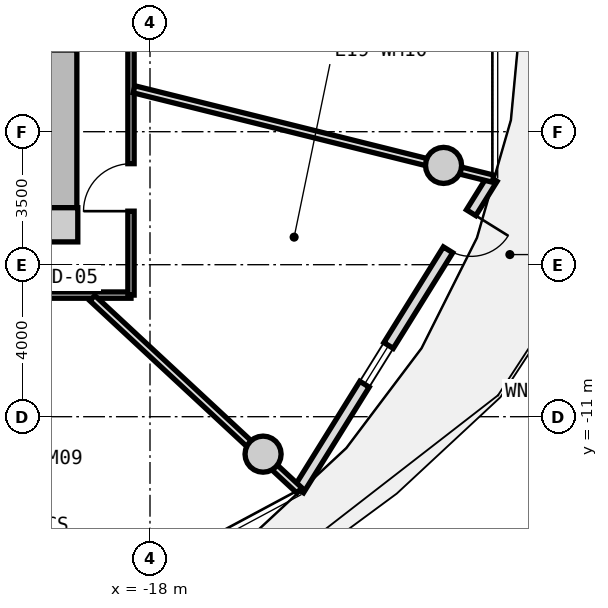
"""IFC4 building model, lengths in metres.
Left out: names, types, materials, properties, quantities, classifications, styles, units other than length and angle.
Written with IfcOpenShell. Run it as: python <this file> out.ifc"""

import sys

from ifc_helpers import new_model, si_unit, direction, frame, frame_2d, origin, origin_2d, place, context, subcontext, project, spatial, rectangle, circle, extrude, source, transform, mapped, element, fill, save


model = new_model("IFC4")
c1 = context("Model", 3, precision=1e-05, world=origin(), true_north=direction((0.0, 1.0)))
c2 = subcontext(c1, "Body", "Model", "MODEL_VIEW")
j1 = project(units=[si_unit("LENGTHUNIT", "METRE"), si_unit("PLANEANGLEUNIT", "RADIAN")], contexts=[c1])
p1 = place(None, origin())
s1 = spatial("IfcSite", under=j1, at=p1, CompositionType="ELEMENT")
p2 = place(p1, origin())
s2 = spatial("IfcBuilding", under=s1, at=p2, CompositionType="ELEMENT")
p3 = place(p2, frame((0.0, 0.0, 64.3)))
s3 = spatial("IfcBuildingStorey", under=s2, at=p3, CompositionType="ELEMENT", Elevation=64.3)
m1 = source(origin(), c2, "Body", "SweptSolid", [
    extrude(rectangle(XDim=0.9, YDim=0.9, at=origin_2d()), origin(), (0.0, 0.0, 1.0), 3.05),
])
p4 = place(p3, frame((-20.35, -5.95, 0.0), z_axis=(0.0, 0.0, 1.0), x_axis=(1.0, 0.0, 0.0)))
e1 = element("IfcColumn", 1, at=p4, inside=s3, PredefinedType="COLUMN", context=c2, shape_type="MappedRepresentation", body=[
    mapped(m1, transform((0.0, 0.0, 0.0), x_axis=(1.0, 0.0, 0.0), y_axis=(0.0, 1.0, 0.0), z_axis=(0.0, 0.0, 1.0), scale=1.0)),
])
m2 = source(origin(), c2, "Body", "SweptSolid", [
    extrude(rectangle(XDim=11.0, YDim=0.85, at=frame_2d((5.5, 0.0))), origin(), (0.0, 0.0, 1.0), 2.79),
])
p5 = place(p3, frame((-20.35, 5.5, 0.0), z_axis=(0.0, 0.0, 1.0), x_axis=(0.0, -1.0, 0.0)))
e2 = element("IfcWall", 2, at=p5, inside=s3, PredefinedType="SHEAR", context=c2, shape_type="MappedRepresentation", body=[
    mapped(m2, transform((0.0, 0.0, 0.0), x_axis=(1.0, 0.0, 0.0), y_axis=(0.0, 1.0, 0.0), z_axis=(0.0, 0.0, 1.0), scale=1.0)),
])
p6 = place(p5, frame((5.65, 0.0, 0.0)))
e3 = element("IfcOpeningElement", 3, at=p6, cuts=e2, PredefinedType="OPENING", context=c2, shape_type="SweptSolid", body=[
    extrude(rectangle(XDim=1.2, YDim=2.15, at=frame_2d((0.6, 1.075))), frame((0.0, 0.435, 0.0), z_axis=(0.0, -1.0, 0.0), x_axis=(1.0, 0.0, 0.0)), (0.0, 0.0, 1.0), 0.87),
])
m3 = source(origin(), c2, "Body", "SweptSolid", [
    extrude(circle(Radius=0.475, at=origin_2d()), origin(), (0.0, 0.0, 1.0), 3.05),
])
for number, where, z_axis, x_axis in (
    (4, (-15.025, -11.985, 0.0), (0.0, 0.0, 1.0), (1.0, 0.0, 0.0)),
    (5, (-10.275, -4.387, 0.0), (0.0, 0.0, 1.0), (1.0, 0.0, 0.0)),
):
    element("IfcColumn", number, at=place(p3, frame(where, z_axis=z_axis, x_axis=x_axis)), inside=s3, PredefinedType="COLUMN", context=c2, shape_type="MappedRepresentation", body=[
        mapped(m3, transform((0.0, 0.0, 0.0), x_axis=(1.0, 0.0, 0.0), y_axis=(0.0, 1.0, 0.0), z_axis=(0.0, 0.0, 1.0), scale=1.0)),
    ])
m4 = source(origin(), c2, "Body", "SweptSolid", [
    extrude(rectangle(XDim=9.649, YDim=0.29, at=frame_2d((4.824, 0.0))), origin(), (0.0, 0.0, 1.0), 2.79),
])
p7 = place(p3, frame((-8.99, -4.731, 0.0), z_axis=(0.0, 0.0, 1.0), x_axis=(-0.527909458386, -0.849300655684, 0.0)))
e6 = element("IfcWall", 6, at=p7, inside=s3, PredefinedType="SOLIDWALL", context=c2, shape_type="MappedRepresentation", body=[
    mapped(m4, transform((0.0, 0.0, 0.0), x_axis=(1.0, 0.0, 0.0), y_axis=(0.0, 1.0, 0.0), z_axis=(0.0, 0.0, 1.0), scale=1.0)),
])
p8 = place(p7, frame((1.06, 0.0, 0.0)))
e7 = element("IfcOpeningElement", 7, at=p8, cuts=e6, PredefinedType="OPENING", context=c2, shape_type="SweptSolid", body=[
    extrude(rectangle(XDim=1.15, YDim=2.25, at=frame_2d((0.575, 1.125))), frame((0.0, 0.155, 0.0), z_axis=(0.0, -1.0, 0.0), x_axis=(1.0, 0.0, 0.0)), (0.0, 0.0, 1.0), 0.31),
])
p9 = place(p7, frame((5.174, 0.0, 0.85)))
e8 = element("IfcOpeningElement", 8, at=p9, cuts=e6, PredefinedType="OPENING", context=c2, shape_type="SweptSolid", body=[
    extrude(rectangle(XDim=1.2, YDim=1.5, at=frame_2d((0.6, 0.75))), frame((0.0, 0.155, 0.0), z_axis=(0.0, -1.0, 0.0), x_axis=(1.0, 0.0, 0.0)), (0.0, 0.0, 1.0), 0.31),
])
m5 = source(origin(), c2, "Body", "SweptSolid", [
    extrude(rectangle(XDim=19.0, YDim=0.165, at=frame_2d((9.5, 0.0))), origin(), (0.0, 0.0, 1.0), 2.775),
])
p10 = place(p3, frame((-18.5, -7.8, 0.0), z_axis=(0.0, 0.0, 1.0), x_axis=(-1.0, 0.0, 0.0)))
e9 = element("IfcWall", 9, at=p10, inside=s3, PredefinedType="PARTITIONING", context=c2, shape_type="MappedRepresentation", body=[
    mapped(m5, transform((0.0, 0.0, 0.0), x_axis=(1.0, 0.0, 0.0), y_axis=(0.0, 1.0, 0.0), z_axis=(0.0, 0.0, 1.0), scale=1.0)),
])
p11 = place(p10, frame((14.244, 0.0, 0.0)))
e10 = element("IfcOpeningElement", 10, at=p11, cuts=e9, PredefinedType="OPENING", context=c2, shape_type="SweptSolid", body=[
    extrude(rectangle(XDim=1.25, YDim=2.2, at=frame_2d((0.625, 1.1))), frame((0.0, 0.093, 0.0), z_axis=(0.0, -1.0, 0.0), x_axis=(1.0, 0.0, 0.0)), (0.0, 0.0, 1.0), 0.185),
])
p12 = place(p10, frame((10.523, 0.0, 0.0)))
e11 = element("IfcOpeningElement", 11, at=p12, cuts=e9, PredefinedType="OPENING", context=c2, shape_type="SweptSolid", body=[
    extrude(rectangle(XDim=0.92, YDim=2.1, at=frame_2d((0.46, 1.05))), frame((0.0, 0.093, 0.0), z_axis=(0.0, -1.0, 0.0), x_axis=(1.0, 0.0, 0.0)), (0.0, 0.0, 1.0), 0.185),
])
p13 = place(p10, frame((8.226, 0.0, 0.0)))
e12 = element("IfcOpeningElement", 12, at=p13, cuts=e9, PredefinedType="OPENING", context=c2, shape_type="SweptSolid", body=[
    extrude(rectangle(XDim=0.92, YDim=2.1, at=frame_2d((0.46, 1.05))), frame((0.0, 0.093, 0.0), z_axis=(0.0, -1.0, 0.0), x_axis=(1.0, 0.0, 0.0)), (0.0, 0.0, 1.0), 0.185),
])
p14 = place(p10, frame((3.506, 0.0, 0.0)))
e13 = element("IfcOpeningElement", 13, at=p14, cuts=e9, PredefinedType="OPENING", context=c2, shape_type="SweptSolid", body=[
    extrude(rectangle(XDim=1.25, YDim=2.2, at=frame_2d((0.625, 1.1))), frame((0.0, 0.093, 0.0), z_axis=(0.0, -1.0, 0.0), x_axis=(1.0, 0.0, 0.0)), (0.0, 0.0, 1.0), 0.185),
])
m6 = source(origin(), c2, "Body", "SweptSolid", [
    extrude(rectangle(XDim=15.6, YDim=0.165, at=frame_2d((7.8, 0.0))), origin(), (0.0, 0.0, 1.0), 2.775),
])
p15 = place(p3, frame((-18.5, 7.8, 0.0), z_axis=(0.0, 0.0, 1.0), x_axis=(0.0, -1.0, 0.0)))
e14 = element("IfcWall", 14, at=p15, inside=s3, PredefinedType="PARTITIONING", context=c2, shape_type="MappedRepresentation", body=[
    mapped(m6, transform((0.0, 0.0, 0.0), x_axis=(1.0, 0.0, 0.0), y_axis=(0.0, 1.0, 0.0), z_axis=(0.0, 0.0, 1.0), scale=1.0)),
])
p16 = place(p15, frame((12.141, 0.0, 0.0)))
e15 = element("IfcOpeningElement", 15, at=p16, cuts=e14, PredefinedType="OPENING", context=c2, shape_type="SweptSolid", body=[
    extrude(rectangle(XDim=1.25, YDim=2.2, at=frame_2d((0.625, 1.1))), frame((0.0, 0.093, 0.0), z_axis=(0.0, -1.0, 0.0), x_axis=(1.0, 0.0, 0.0)), (0.0, 0.0, 1.0), 0.185),
])
p17 = place(p15, frame((7.175, 0.0, 0.0)))
e16 = element("IfcOpeningElement", 16, at=p17, cuts=e14, PredefinedType="OPENING", context=c2, shape_type="SweptSolid", body=[
    extrude(rectangle(XDim=1.25, YDim=2.2, at=frame_2d((0.625, 1.1))), frame((0.0, 0.093, 0.0), z_axis=(0.0, -1.0, 0.0), x_axis=(1.0, 0.0, 0.0)), (0.0, 0.0, 1.0), 0.185),
])
p18 = place(p15, frame((2.826, 0.0, 0.0)))
e17 = element("IfcOpeningElement", 17, at=p18, cuts=e14, PredefinedType="OPENING", context=c2, shape_type="SweptSolid", body=[
    extrude(rectangle(XDim=1.05, YDim=2.15, at=frame_2d((0.525, 1.075))), frame((0.0, 0.093, 0.0), z_axis=(0.0, -1.0, 0.0), x_axis=(1.0, 0.0, 0.0)), (0.0, 0.0, 1.0), 0.185),
])
p19 = place(p15, frame((0.881, 0.0, 0.0)))
e18 = element("IfcOpeningElement", 18, at=p19, cuts=e14, PredefinedType="OPENING", context=c2, shape_type="SweptSolid", body=[
    extrude(rectangle(XDim=1.05, YDim=2.15, at=frame_2d((0.525, 1.075))), frame((0.0, 0.093, 0.0), z_axis=(0.0, -1.0, 0.0), x_axis=(1.0, 0.0, 0.0)), (0.0, 0.0, 1.0), 0.185),
])
m7 = source(origin(), c2, "Body", "SweptSolid", [
    extrude(rectangle(XDim=7.435, YDim=0.19, at=frame_2d((3.717, 0.0))), origin(), (0.0, 0.0, 1.0), 2.225),
])
p20 = place(p3, frame((-19.517, -7.88, 0.0), z_axis=(0.0, 0.0, 1.0), x_axis=(0.732651956848, -0.680603489652, 0.0)))
e19 = element("IfcWall", 19, at=p20, inside=s3, PredefinedType="PARTITIONING", context=c2, shape_type="MappedRepresentation", body=[
    mapped(m7, transform((0.0, 0.0, 0.0), x_axis=(1.0, 0.0, 0.0), y_axis=(0.0, 1.0, 0.0), z_axis=(0.0, 0.0, 1.0), scale=1.0)),
])
m8 = source(origin(), c2, "Body", "SweptSolid", [
    extrude(rectangle(XDim=9.737, YDim=0.19, at=frame_2d((4.869, 0.0))), origin(), (0.0, 0.0, 1.0), 2.225),
])
p21 = place(p3, frame((-18.42, -2.385, 0.0), z_axis=(0.0, 0.0, 1.0), x_axis=(0.970392716238, -0.241532557375, 0.0)))
e20 = element("IfcWall", 20, at=p21, inside=s3, PredefinedType="PARTITIONING", context=c2, shape_type="MappedRepresentation", body=[
    mapped(m8, transform((0.0, 0.0, 0.0), x_axis=(1.0, 0.0, 0.0), y_axis=(0.0, 1.0, 0.0), z_axis=(0.0, 0.0, 1.0), scale=1.0)),
])
m9 = source(origin(), c2, "Body", "SweptSolid", [
    extrude(rectangle(XDim=1.15, YDim=2.25, at=frame_2d((0.575, 1.125))), frame((0.0, 0.025, 0.0), z_axis=(0.0, -1.0, 0.0), x_axis=(1.0, 0.0, 0.0)), (0.0, 0.0, 1.0), 0.05),
])
p22 = place(p8, origin())
e21 = element("IfcDoor", 21, at=p22, inside=s3, OperationType="SINGLE_SWING_LEFT", PredefinedType="DOOR", context=c2, shape_type="MappedRepresentation", body=[
    mapped(m9, transform((0.0, 0.0, 0.0), x_axis=(1.0, 0.0, 0.0), y_axis=(0.0, 1.0, 0.0), z_axis=(0.0, 0.0, 1.0), scale=1.0)),
])
fill(e7, e21)
m10 = source(origin(), c2, "Body", "SweptSolid", [
    extrude(rectangle(XDim=1.2, YDim=1.5, at=frame_2d((0.6, 0.75))), frame((0.0, 0.03, 0.0), z_axis=(0.0, -1.0, 0.0), x_axis=(1.0, 0.0, 0.0)), (0.0, 0.0, 1.0), 0.06),
])
p23 = place(p9, origin())
e22 = element("IfcWindow", 22, at=p23, inside=s3, PartitioningType="SINGLE_PANEL", PredefinedType="WINDOW", context=c2, shape_type="MappedRepresentation", body=[
    mapped(m10, transform((0.0, 0.0, 0.0), x_axis=(1.0, 0.0, 0.0), y_axis=(0.0, 1.0, 0.0), z_axis=(0.0, 0.0, 1.0), scale=1.0)),
])
fill(e8, e22)
m11 = source(origin(), c2, "Body", "SweptSolid", [
    extrude(rectangle(XDim=1.25, YDim=2.2, at=frame_2d((0.625, 1.1))), frame((0.0, 0.025, 0.0), z_axis=(0.0, -1.0, 0.0), x_axis=(1.0, 0.0, 0.0)), (0.0, 0.0, 1.0), 0.05),
])
p24 = place(p16, frame((1.25, 0.0, 0.0), z_axis=(0.0, 0.0, 1.0), x_axis=(-1.0, 0.0, 0.0)))
e23 = element("IfcDoor", 23, at=p24, inside=s3, OperationType="SINGLE_SWING_LEFT", PredefinedType="DOOR", context=c2, shape_type="MappedRepresentation", body=[
    mapped(m11, transform((0.0, 0.0, 0.0), x_axis=(1.0, 0.0, 0.0), y_axis=(0.0, 1.0, 0.0), z_axis=(0.0, 0.0, 1.0), scale=1.0)),
])
fill(e15, e23)
save(model, sys.argv[1])
